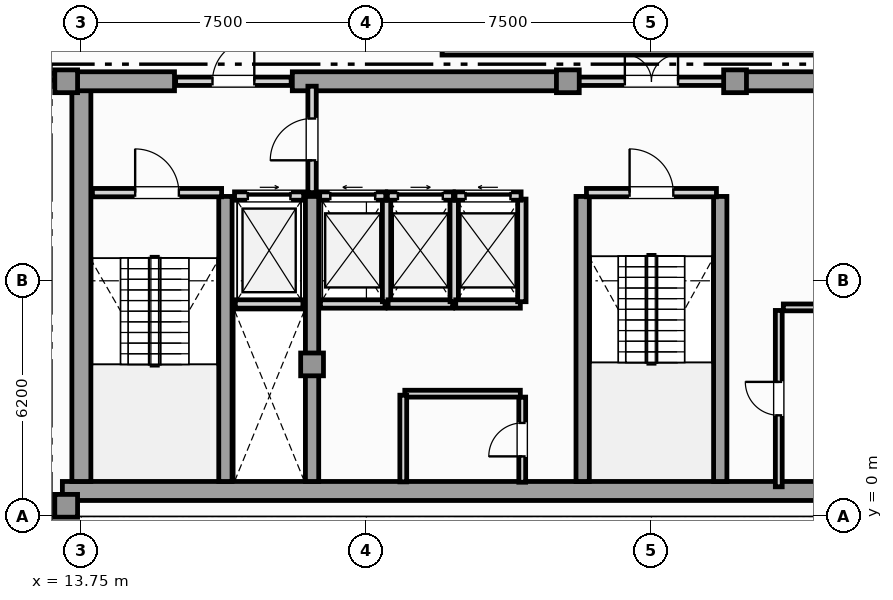
"""IFC4 building model, lengths in metres.
Left out: names, types, materials, properties, quantities, classifications, styles, units other than length and angle.
Written with IfcOpenShell. Run it as: python <this file> out.ifc"""

import sys

from ifc_helpers import new_model, si_unit, direction, frame, frame_2d, origin, origin_2d, place, context, subcontext, project, spatial, rectangle, extrude, element, fill, save


model = new_model("IFC4")
c1 = context("Model", 3, precision=1e-05, world=origin(), true_north=direction((0.0, 1.0)))
c2 = subcontext(c1, "Body", "Model", "MODEL_VIEW")
j1 = project(units=[si_unit("LENGTHUNIT", "METRE"), si_unit("PLANEANGLEUNIT", "RADIAN")], contexts=[c1])
p1 = place(None, origin())
s1 = spatial("IfcSite", under=j1, at=p1, CompositionType="ELEMENT")
p2 = place(p1, origin())
s2 = spatial("IfcBuilding", under=s1, at=p2, CompositionType="ELEMENT")
p3 = place(p2, frame((0.0, 0.0, 341.35)))
s3 = spatial("IfcBuildingStorey", under=s2, at=p3, CompositionType="ELEMENT", Elevation=341.35)
p4 = place(p3, frame((13.25, 0.67, 0.0), z_axis=(0.0, 0.0, 1.0), x_axis=(1.0, 0.0, 0.0)))
e1 = element("IfcWall", 1, at=p4, inside=s3, PredefinedType="SHEAR", context=c2, shape_type="SweptSolid", body=[
    extrude(rectangle(XDim=31.0, YDim=0.5, at=frame_2d((15.5, 0.0))), origin(), (0.0, 0.0, 1.0), 3.63),
])
p5 = place(p3, frame((13.75, 0.92, 0.0), z_axis=(0.0, 0.0, 1.0), x_axis=(0.0, 1.0, 0.0)))
e2 = element("IfcWall", 2, at=p5, inside=s3, PredefinedType="SHEAR", context=c2, shape_type="SweptSolid", body=[
    extrude(rectangle(XDim=10.53, YDim=0.5, at=frame_2d((5.265, 0.0))), origin(), (0.0, 0.0, 1.0), 3.63),
])
p6 = place(p3, frame((13.25, 11.45, 0.0), z_axis=(0.0, 0.0, 1.0), x_axis=(1.0, 0.0, 0.0)))
e3 = element("IfcWall", 3, at=p6, inside=s3, PredefinedType="SHEAR", context=c2, shape_type="SweptSolid", body=[
    extrude(rectangle(XDim=2.95, YDim=0.5, at=frame_2d((1.475, 0.0))), origin(), (0.0, 0.0, 1.0), 3.63),
])
for number, where, z_axis, x_axis in (
    (4, (19.3, 11.45, 0.0), (0.0, 0.0, 1.0), (1.0, 0.0, 0.0)),
    (5, (30.9, 11.45, 0.0), (0.0, 0.0, 1.0), (1.0, 0.0, 0.0)),
):
    element("IfcWall", number, at=place(p3, frame(where, z_axis=z_axis, x_axis=x_axis)), inside=s3, PredefinedType="SHEAR", context=c2, shape_type="SweptSolid", body=[
        extrude(rectangle(XDim=7.3, YDim=0.5, at=frame_2d((3.65, 0.0))), origin(), (0.0, 0.0, 1.0), 3.63),
    ])
for number, where, z_axis, x_axis in (
    (6, (17.54, 0.92, 0.0), (0.0, 0.0, 1.0), (0.0, 1.0, 0.0)),
    (7, (19.82, 0.92, 0.0), (0.0, 0.0, 1.0), (0.0, 1.0, 0.0)),
    (8, (26.94, 0.92, 0.0), (0.0, 0.0, 1.0), (0.0, 1.0, 0.0)),
    (9, (30.56, 0.92, 0.0), (0.0, 0.0, 1.0), (0.0, 1.0, 0.0)),
):
    element("IfcWall", number, at=place(p3, frame(where, z_axis=z_axis, x_axis=x_axis)), inside=s3, PredefinedType="SHEAR", context=c2, shape_type="SweptSolid", body=[
        extrude(rectangle(XDim=7.5, YDim=0.35, at=frame_2d((3.75, 0.0))), origin(), (0.0, 0.0, 1.0), 3.63),
    ])
for number, where, z_axis, x_axis in (
    (10, (13.35, 0.28, 0.0), (0.0, 0.0, 1.0), (1.0, 0.0, 0.0)),
    (11, (13.35, 11.45, 0.0), (0.0, 0.0, 1.0), (1.0, 0.0, 0.0)),
    (12, (19.82, 4.0, 0.0), (0.0, 0.0, 1.0), (1.0, 0.0, 0.0)),
    (13, (26.55, 11.45, 0.0), (0.0, 0.0, 1.0), (1.0, 0.0, 0.0)),
    (14, (30.95, 11.45, 0.0), (0.0, 0.0, 1.0), (1.0, 0.0, 0.0)),
):
    element("IfcColumn", number, at=place(p3, frame(where, z_axis=z_axis, x_axis=x_axis)), inside=s3, PredefinedType="COLUMN", context=c2, shape_type="SweptSolid", body=[
        extrude(rectangle(XDim=0.6, YDim=0.6, at=origin_2d()), origin(), (0.0, 0.0, 1.0), 3.85),
    ])
p7 = place(p3, frame((34.26, 12.27, 0.0), z_axis=(0.0, 0.0, 1.0), x_axis=(-1.0, 0.0, 0.0)))
e15 = element("IfcWall", 15, at=p7, inside=s3, PredefinedType="SOLIDWALL", context=c2, shape_type="SweptSolid", body=[
    extrude(rectangle(XDim=11.02, YDim=0.26, at=frame_2d((5.51, 0.0))), origin(), (0.0, 0.0, 1.0), 3.63),
])
p8 = place(p3, frame((17.8, 5.59, 0.0), z_axis=(0.0, 0.0, 1.0), x_axis=(1.0, 0.0, 0.0)))
e16 = element("IfcWall", 16, at=p8, inside=s3, PredefinedType="SOLIDWALL", context=c2, shape_type="SweptSolid", body=[
    extrude(rectangle(XDim=1.78, YDim=0.22, at=frame_2d((0.89, 0.0))), origin(), (0.0, 0.0, 1.0), 3.63),
])
p9 = place(p3, frame((17.78, 8.43, 0.0), z_axis=(0.0, 0.0, 1.0), x_axis=(1.0, 0.0, 0.0)))
e17 = element("IfcWall", 17, at=p9, inside=s3, PredefinedType="SOLIDWALL", context=c2, shape_type="SweptSolid", body=[
    extrude(rectangle(XDim=1.82, YDim=0.22, at=frame_2d((0.91, 0.0))), origin(), (0.0, 0.0, 1.0), 3.63),
])
p10 = place(p9, frame((0.35, 0.0, 0.0)))
e18 = element("IfcOpeningElement", 18, at=p10, cuts=e17, PredefinedType="OPENING", context=c2, shape_type="SweptSolid", body=[
    extrude(rectangle(XDim=1.12, YDim=2.25, at=frame_2d((0.56, 1.125))), frame((0.0, 0.12, 0.0), z_axis=(0.0, -1.0, 0.0), x_axis=(1.0, 0.0, 0.0)), (0.0, 0.0, 1.0), 0.24),
])
p11 = place(p3, frame((20.04, 5.59, 0.0), z_axis=(0.0, 0.0, 1.0), x_axis=(1.0, 0.0, 0.0)))
e19 = element("IfcWall", 19, at=p11, inside=s3, PredefinedType="SOLIDWALL", context=c2, shape_type="SweptSolid", body=[
    extrude(rectangle(XDim=1.7, YDim=0.22, at=frame_2d((0.85, 0.0))), origin(), (0.0, 0.0, 1.0), 3.63),
])
p12 = place(p3, frame((21.78, 5.65, 0.0), z_axis=(0.0, 0.0, 1.0), x_axis=(0.0, 1.0, 0.0)))
e20 = element("IfcWall", 20, at=p12, inside=s3, PredefinedType="SOLIDWALL", context=c2, shape_type="SweptSolid", body=[
    extrude(rectangle(XDim=2.7, YDim=0.22, at=frame_2d((1.35, 0.0))), origin(), (0.0, 0.0, 1.0), 3.63),
])
p13 = place(p3, frame((20.02, 8.43, 0.0), z_axis=(0.0, 0.0, 1.0), x_axis=(1.0, 0.0, 0.0)))
e21 = element("IfcWall", 21, at=p13, inside=s3, PredefinedType="SOLIDWALL", context=c2, shape_type="SweptSolid", body=[
    extrude(rectangle(XDim=1.74, YDim=0.22, at=frame_2d((0.87, 0.0))), origin(), (0.0, 0.0, 1.0), 3.63),
])
p14 = place(p13, frame((0.28, 0.0, 0.0)))
e22 = element("IfcOpeningElement", 22, at=p14, cuts=e21, PredefinedType="OPENING", context=c2, shape_type="SweptSolid", body=[
    extrude(rectangle(XDim=1.18, YDim=2.2, at=frame_2d((0.59, 1.1))), frame((0.0, 0.12, 0.0), z_axis=(0.0, -1.0, 0.0), x_axis=(1.0, 0.0, 0.0)), (0.0, 0.0, 1.0), 0.24),
])
p15 = place(p3, frame((21.82, 5.59, 0.0), z_axis=(0.0, 0.0, 1.0), x_axis=(1.0, 0.0, 0.0)))
e23 = element("IfcWall", 23, at=p15, inside=s3, PredefinedType="SOLIDWALL", context=c2, shape_type="SweptSolid", body=[
    extrude(rectangle(XDim=1.7, YDim=0.22, at=frame_2d((0.85, 0.0))), origin(), (0.0, 0.0, 1.0), 3.63),
])
p16 = place(p3, frame((23.56, 5.65, 0.0), z_axis=(0.0, 0.0, 1.0), x_axis=(0.0, 1.0, 0.0)))
e24 = element("IfcWall", 24, at=p16, inside=s3, PredefinedType="SOLIDWALL", context=c2, shape_type="SweptSolid", body=[
    extrude(rectangle(XDim=2.7, YDim=0.22, at=frame_2d((1.35, 0.0))), origin(), (0.0, 0.0, 1.0), 3.63),
])
p17 = place(p3, frame((21.8, 8.43, 0.0), z_axis=(0.0, 0.0, 1.0), x_axis=(1.0, 0.0, 0.0)))
e25 = element("IfcWall", 25, at=p17, inside=s3, PredefinedType="SOLIDWALL", context=c2, shape_type="SweptSolid", body=[
    extrude(rectangle(XDim=1.74, YDim=0.22, at=frame_2d((0.87, 0.0))), origin(), (0.0, 0.0, 1.0), 3.63),
])
p18 = place(p17, frame((0.28, 0.0, 0.0)))
e26 = element("IfcOpeningElement", 26, at=p18, cuts=e25, PredefinedType="OPENING", context=c2, shape_type="SweptSolid", body=[
    extrude(rectangle(XDim=1.18, YDim=2.2, at=frame_2d((0.59, 1.1))), frame((0.0, 0.12, 0.0), z_axis=(0.0, -1.0, 0.0), x_axis=(1.0, 0.0, 0.0)), (0.0, 0.0, 1.0), 0.24),
])
p19 = place(p3, frame((23.6, 5.59, 0.0), z_axis=(0.0, 0.0, 1.0), x_axis=(1.0, 0.0, 0.0)))
e27 = element("IfcWall", 27, at=p19, inside=s3, PredefinedType="SOLIDWALL", context=c2, shape_type="SweptSolid", body=[
    extrude(rectangle(XDim=1.7, YDim=0.22, at=frame_2d((0.85, 0.0))), origin(), (0.0, 0.0, 1.0), 3.63),
])
p20 = place(p3, frame((25.34, 5.65, 0.0), z_axis=(0.0, 0.0, 1.0), x_axis=(0.0, 1.0, 0.0)))
e28 = element("IfcWall", 28, at=p20, inside=s3, PredefinedType="SOLIDWALL", context=c2, shape_type="SweptSolid", body=[
    extrude(rectangle(XDim=2.7, YDim=0.22, at=frame_2d((1.35, 0.0))), origin(), (0.0, 0.0, 1.0), 3.63),
])
p21 = place(p3, frame((23.58, 8.43, 0.0), z_axis=(0.0, 0.0, 1.0), x_axis=(1.0, 0.0, 0.0)))
e29 = element("IfcWall", 29, at=p21, inside=s3, PredefinedType="SOLIDWALL", context=c2, shape_type="SweptSolid", body=[
    extrude(rectangle(XDim=1.74, YDim=0.22, at=frame_2d((0.87, 0.0))), origin(), (0.0, 0.0, 1.0), 3.63),
])
p22 = place(p21, frame((0.28, 0.0, 0.0)))
e30 = element("IfcOpeningElement", 30, at=p22, cuts=e29, PredefinedType="OPENING", context=c2, shape_type="SweptSolid", body=[
    extrude(rectangle(XDim=1.18, YDim=2.2, at=frame_2d((0.59, 1.1))), frame((0.0, 0.12, 0.0), z_axis=(0.0, -1.0, 0.0), x_axis=(1.0, 0.0, 0.0)), (0.0, 0.0, 1.0), 0.24),
])
p23 = place(p3, frame((14.04, 8.52, 0.0), z_axis=(0.0, 0.0, 1.0), x_axis=(1.0, 0.0, 0.0)))
e31 = element("IfcWall", 31, at=p23, inside=s3, PredefinedType="SOLIDWALL", context=c2, shape_type="SweptSolid", body=[
    extrude(rectangle(XDim=3.4, YDim=0.22, at=frame_2d((1.7, 0.0))), origin(), (0.0, 0.0, 1.0), 3.63),
])
p24 = place(p23, frame((1.125, 0.0, 0.0)))
e32 = element("IfcOpeningElement", 32, at=p24, cuts=e31, PredefinedType="OPENING", context=c2, shape_type="SweptSolid", body=[
    extrude(rectangle(XDim=1.15, YDim=2.2, at=frame_2d((0.575, 1.1))), frame((0.0, 0.12, 0.0), z_axis=(0.0, -1.0, 0.0), x_axis=(1.0, 0.0, 0.0)), (0.0, 0.0, 1.0), 0.24),
])
p25 = place(p3, frame((27.04, 8.52, 0.0), z_axis=(0.0, 0.0, 1.0), x_axis=(1.0, 0.0, 0.0)))
e33 = element("IfcWall", 33, at=p25, inside=s3, PredefinedType="SOLIDWALL", context=c2, shape_type="SweptSolid", body=[
    extrude(rectangle(XDim=3.42, YDim=0.22, at=frame_2d((1.71, 0.0))), origin(), (0.0, 0.0, 1.0), 3.63),
])
p26 = place(p25, frame((1.135, 0.0, 0.0)))
e34 = element("IfcOpeningElement", 34, at=p26, cuts=e33, PredefinedType="OPENING", context=c2, shape_type="SweptSolid", body=[
    extrude(rectangle(XDim=1.15, YDim=2.2, at=frame_2d((0.575, 1.1))), frame((0.0, 0.12, 0.0), z_axis=(0.0, -1.0, 0.0), x_axis=(1.0, 0.0, 0.0)), (0.0, 0.0, 1.0), 0.24),
])
p27 = place(p3, frame((19.82, 8.52, 0.0), z_axis=(0.0, 0.0, 1.0), x_axis=(0.0, 1.0, 0.0)))
e35 = element("IfcWall", 35, at=p27, inside=s3, PredefinedType="SOLIDWALL", context=c2, shape_type="SweptSolid", body=[
    extrude(rectangle(XDim=2.8, YDim=0.22, at=frame_2d((1.4, 0.0))), origin(), (0.0, 0.0, 1.0), 3.085),
])
p28 = place(p27, frame((0.85, 0.0, 0.0)))
e36 = element("IfcOpeningElement", 36, at=p28, cuts=e35, PredefinedType="OPENING", context=c2, shape_type="SweptSolid", body=[
    extrude(rectangle(XDim=1.1, YDim=2.2, at=frame_2d((0.55, 1.1))), frame((0.0, 0.12, 0.0), z_axis=(0.0, -1.0, 0.0), x_axis=(1.0, 0.0, 0.0)), (0.0, 0.0, 1.0), 0.24),
])
p29 = place(p3, frame((16.23, 11.45, 0.0), z_axis=(0.0, 0.0, 1.0), x_axis=(1.0, 0.0, 0.0)))
e37 = element("IfcWall", 37, at=p29, inside=s3, PredefinedType="SOLIDWALL", context=c2, shape_type="SweptSolid", body=[
    extrude(rectangle(XDim=3.04, YDim=0.22, at=frame_2d((1.52, 0.0))), origin(), (0.0, 0.0, 1.0), 3.63),
])
p30 = place(p29, frame((0.97, 0.0, 0.0)))
e38 = element("IfcOpeningElement", 38, at=p30, cuts=e37, PredefinedType="OPENING", context=c2, shape_type="SweptSolid", body=[
    extrude(rectangle(XDim=1.1, YDim=2.2, at=frame_2d((0.55, 1.1))), frame((0.0, 0.12, 0.0), z_axis=(0.0, -1.0, 0.0), x_axis=(1.0, 0.0, 0.0)), (0.0, 0.0, 1.0), 0.24),
])
p31 = place(p3, frame((26.63, 11.45, 0.0), z_axis=(0.0, 0.0, 1.0), x_axis=(1.0, 0.0, 0.0)))
e39 = element("IfcWall", 39, at=p31, inside=s3, PredefinedType="SOLIDWALL", context=c2, shape_type="SweptSolid", body=[
    extrude(rectangle(XDim=4.24, YDim=0.22, at=frame_2d((2.12, 0.0))), origin(), (0.0, 0.0, 1.0), 3.63),
])
p32 = place(p31, frame((1.42, 0.0, 0.0)))
e40 = element("IfcOpeningElement", 40, at=p32, cuts=e39, PredefinedType="OPENING", context=c2, shape_type="SweptSolid", body=[
    extrude(rectangle(XDim=1.4, YDim=2.2, at=frame_2d((0.7, 1.1))), frame((0.0, 0.12, 0.0), z_axis=(0.0, -1.0, 0.0), x_axis=(1.0, 0.0, 0.0)), (0.0, 0.0, 1.0), 0.24),
])
p33 = place(p3, frame((25.35, 0.9, 0.0), z_axis=(0.0, 0.0, 1.0), x_axis=(0.0, 1.0, 0.0)))
e41 = element("IfcWall", 41, at=p33, inside=s3, PredefinedType="PARTITIONING", context=c2, shape_type="SweptSolid", body=[
    extrude(rectangle(XDim=2.24, YDim=0.18, at=frame_2d((1.12, 0.0))), origin(), (0.0, 0.0, 1.0), 3.63),
])
p34 = place(p33, frame((0.68, 0.0, 0.0)))
e42 = element("IfcOpeningElement", 42, at=p34, cuts=e41, PredefinedType="OPENING", context=c2, shape_type="SweptSolid", body=[
    extrude(rectangle(XDim=0.88, YDim=2.05, at=frame_2d((0.44, 1.025))), frame((0.0, 0.1, 0.0), z_axis=(0.0, -1.0, 0.0), x_axis=(1.0, 0.0, 0.0)), (0.0, 0.0, 1.0), 0.2),
])
p35 = place(p3, frame((22.26, 3.23, 0.0), z_axis=(0.0, 0.0, 1.0), x_axis=(1.0, 0.0, 0.0)))
e43 = element("IfcWall", 43, at=p35, inside=s3, PredefinedType="PARTITIONING", context=c2, shape_type="SweptSolid", body=[
    extrude(rectangle(XDim=3.04, YDim=0.18, at=frame_2d((1.52, 0.0))), origin(), (0.0, 0.0, 1.0), 3.63),
])
p36 = place(p3, frame((22.22, 0.91, 0.0), z_axis=(0.0, 0.0, 1.0), x_axis=(0.0, 1.0, 0.0)))
e44 = element("IfcWall", 44, at=p36, inside=s3, PredefinedType="PARTITIONING", context=c2, shape_type="SweptSolid", body=[
    extrude(rectangle(XDim=2.28, YDim=0.18, at=frame_2d((1.14, 0.0))), origin(), (0.0, 0.0, 1.0), 3.63),
])
p37 = place(p3, frame((32.1, 0.78, 0.0), z_axis=(0.0, 0.0, 1.0), x_axis=(0.0, 1.0, 0.0)))
e45 = element("IfcWall", 45, at=p37, inside=s3, PredefinedType="PARTITIONING", context=c2, shape_type="SweptSolid", body=[
    extrude(rectangle(XDim=4.64, YDim=0.18, at=frame_2d((2.32, 0.0))), origin(), (0.0, 0.0, 1.0), 3.63),
])
p38 = place(p37, frame((1.88, 0.0, 0.0)))
e46 = element("IfcOpeningElement", 46, at=p38, cuts=e45, PredefinedType="OPENING", context=c2, shape_type="SweptSolid", body=[
    extrude(rectangle(XDim=0.88, YDim=2.05, at=frame_2d((0.44, 1.025))), frame((0.0, 0.1, 0.0), z_axis=(0.0, -1.0, 0.0), x_axis=(1.0, 0.0, 0.0)), (0.0, 0.0, 1.0), 0.2),
])
p39 = place(p3, frame((32.22, 5.5, 0.0), z_axis=(0.0, 0.0, 1.0), x_axis=(1.0, 0.0, 0.0)))
e47 = element("IfcWall", 47, at=p39, inside=s3, PredefinedType="PARTITIONING", context=c2, shape_type="SweptSolid", body=[
    extrude(rectangle(XDim=2.9, YDim=0.18, at=frame_2d((1.45, 0.0))), origin(), (0.0, 0.0, 1.0), 3.63),
])
p40 = place(p3, frame((9.569, 11.57, 0.0), z_axis=(0.0, 0.0, 1.0), x_axis=(1.0, 0.0, 0.0)))
e48 = element("IfcWall", 48, at=p40, inside=s3, PredefinedType="PARTITIONING", context=c2, shape_type="SweptSolid", body=[
    extrude(rectangle(XDim=3.646, YDim=0.18, at=frame_2d((1.823, 0.0))), origin(), (0.0, 0.0, 1.0), 3.63),
])
p41 = place(p40, frame((1.323, 0.0, 0.0)))
e49 = element("IfcOpeningElement", 49, at=p41, cuts=e48, PredefinedType="OPENING", context=c2, shape_type="SweptSolid", body=[
    extrude(rectangle(XDim=1.0, YDim=2.15, at=frame_2d((0.5, 1.075))), frame((0.0, 0.1, 0.0), z_axis=(0.0, -1.0, 0.0), x_axis=(1.0, 0.0, 0.0)), (0.0, 0.0, 1.0), 0.2),
])
p42 = place(p10, origin())
e50 = element("IfcDoor", 50, at=p42, inside=s3, OperationType="SLIDING_TO_RIGHT", PredefinedType="DOOR", context=c2, shape_type="SweptSolid", body=[
    extrude(rectangle(XDim=1.12, YDim=2.25, at=frame_2d((0.56, 1.125))), frame((0.0, 0.025, 0.0), z_axis=(0.0, -1.0, 0.0), x_axis=(1.0, 0.0, 0.0)), (0.0, 0.0, 1.0), 0.05),
])
fill(e18, e50)
p43 = place(p14, origin())
e51 = element("IfcDoor", 51, at=p43, inside=s3, OperationType="SLIDING_TO_LEFT", PredefinedType="DOOR", context=c2, shape_type="SweptSolid", body=[
    extrude(rectangle(XDim=1.18, YDim=2.2, at=frame_2d((0.59, 1.1))), frame((0.0, 0.025, 0.0), z_axis=(0.0, -1.0, 0.0), x_axis=(1.0, 0.0, 0.0)), (0.0, 0.0, 1.0), 0.05),
])
fill(e22, e51)
p44 = place(p18, origin())
e52 = element("IfcDoor", 52, at=p44, inside=s3, OperationType="SLIDING_TO_RIGHT", PredefinedType="DOOR", context=c2, shape_type="SweptSolid", body=[
    extrude(rectangle(XDim=1.18, YDim=2.2, at=frame_2d((0.59, 1.1))), frame((0.0, 0.025, 0.0), z_axis=(0.0, -1.0, 0.0), x_axis=(1.0, 0.0, 0.0)), (0.0, 0.0, 1.0), 0.05),
])
fill(e26, e52)
p45 = place(p22, origin())
e53 = element("IfcDoor", 53, at=p45, inside=s3, OperationType="SLIDING_TO_LEFT", PredefinedType="DOOR", context=c2, shape_type="SweptSolid", body=[
    extrude(rectangle(XDim=1.18, YDim=2.2, at=frame_2d((0.59, 1.1))), frame((0.0, 0.025, 0.0), z_axis=(0.0, -1.0, 0.0), x_axis=(1.0, 0.0, 0.0)), (0.0, 0.0, 1.0), 0.05),
])
fill(e30, e53)
p46 = place(p24, origin())
e54 = element("IfcDoor", 54, at=p46, inside=s3, OperationType="SINGLE_SWING_LEFT", PredefinedType="DOOR", context=c2, shape_type="SweptSolid", body=[
    extrude(rectangle(XDim=1.15, YDim=2.2, at=frame_2d((0.575, 1.1))), frame((0.0, 0.025, 0.0), z_axis=(0.0, -1.0, 0.0), x_axis=(1.0, 0.0, 0.0)), (0.0, 0.0, 1.0), 0.05),
])
fill(e32, e54)
p47 = place(p26, origin())
e55 = element("IfcDoor", 55, at=p47, inside=s3, OperationType="SINGLE_SWING_LEFT", PredefinedType="DOOR", context=c2, shape_type="SweptSolid", body=[
    extrude(rectangle(XDim=1.15, YDim=2.2, at=frame_2d((0.575, 1.1))), frame((0.0, 0.025, 0.0), z_axis=(0.0, -1.0, 0.0), x_axis=(1.0, 0.0, 0.0)), (0.0, 0.0, 1.0), 0.05),
])
fill(e34, e55)
p48 = place(p28, origin())
e56 = element("IfcDoor", 56, at=p48, inside=s3, OperationType="SINGLE_SWING_LEFT", PredefinedType="DOOR", context=c2, shape_type="SweptSolid", body=[
    extrude(rectangle(XDim=1.1, YDim=2.2, at=frame_2d((0.55, 1.1))), frame((0.0, 0.025, 0.0), z_axis=(0.0, -1.0, 0.0), x_axis=(1.0, 0.0, 0.0)), (0.0, 0.0, 1.0), 0.05),
])
fill(e36, e56)
p49 = place(p30, origin())
e57 = element("IfcDoor", 57, at=p49, inside=s3, OperationType="SINGLE_SWING_RIGHT", PredefinedType="DOOR", context=c2, shape_type="SweptSolid", body=[
    extrude(rectangle(XDim=1.1, YDim=2.2, at=frame_2d((0.55, 1.1))), frame((0.0, 0.025, 0.0), z_axis=(0.0, -1.0, 0.0), x_axis=(1.0, 0.0, 0.0)), (0.0, 0.0, 1.0), 0.05),
])
fill(e38, e57)
p50 = place(p32, origin())
e58 = element("IfcDoor", 58, at=p50, inside=s3, OperationType="DOUBLE_DOOR_SINGLE_SWING", PredefinedType="DOOR", context=c2, shape_type="SweptSolid", body=[
    extrude(rectangle(XDim=1.4, YDim=2.2, at=frame_2d((0.7, 1.1))), frame((0.0, 0.025, 0.0), z_axis=(0.0, -1.0, 0.0), x_axis=(1.0, 0.0, 0.0)), (0.0, 0.0, 1.0), 0.05),
])
fill(e40, e58)
p51 = place(p34, origin())
e59 = element("IfcDoor", 59, at=p51, inside=s3, OperationType="SINGLE_SWING_LEFT", PredefinedType="DOOR", context=c2, shape_type="SweptSolid", body=[
    extrude(rectangle(XDim=0.88, YDim=2.05, at=frame_2d((0.44, 1.025))), frame((0.0, 0.025, 0.0), z_axis=(0.0, -1.0, 0.0), x_axis=(1.0, 0.0, 0.0)), (0.0, 0.0, 1.0), 0.05),
])
fill(e42, e59)
p52 = place(p38, origin())
e60 = element("IfcDoor", 60, at=p52, inside=s3, OperationType="SINGLE_SWING_RIGHT", PredefinedType="DOOR", context=c2, shape_type="SweptSolid", body=[
    extrude(rectangle(XDim=0.88, YDim=2.05, at=frame_2d((0.44, 1.025))), frame((0.0, 0.025, 0.0), z_axis=(0.0, -1.0, 0.0), x_axis=(1.0, 0.0, 0.0)), (0.0, 0.0, 1.0), 0.05),
])
fill(e46, e60)
save(model, sys.argv[1])
